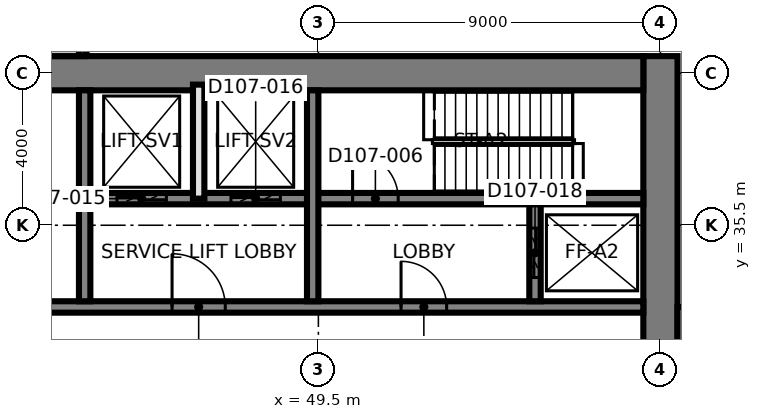
"""IFC4 building model, lengths in metres.
Left out: names, types, materials, properties, quantities, classifications, styles, units other than length and angle.
Written with IfcOpenShell. Run it as: python <this file> out.ifc"""

import sys

from ifc_helpers import new_model, si_unit, direction, frame, frame_2d, origin, place, context, subcontext, project, spatial, rectangle, extrude, element, fill, save


model = new_model("IFC4")
c1 = context("Model", 3, precision=1e-05, world=origin(), true_north=direction((0.0, 1.0)))
c2 = subcontext(c1, "Body", "Model", "MODEL_VIEW")
j1 = project(units=[si_unit("LENGTHUNIT", "METRE"), si_unit("PLANEANGLEUNIT", "RADIAN")], contexts=[c1])
p1 = place(None, origin())
s1 = spatial("IfcSite", under=j1, at=p1, CompositionType="ELEMENT")
p2 = place(p1, origin())
s2 = spatial("IfcBuilding", under=s1, at=p2, CompositionType="ELEMENT")
p3 = place(p2, frame((0.0, 0.0, 28.5)))
s3 = spatial("IfcBuildingStorey", under=s2, at=p3, CompositionType="ELEMENT", Elevation=28.5)
p4 = place(p3, frame((58.5, 21.05, 0.0), z_axis=(0.0, 0.0, 1.0), x_axis=(0.0, 1.0, 0.0)))
e1 = element("IfcWall", 1, at=p4, inside=s3, PredefinedType="SHEAR", context=c2, shape_type="SweptSolid", body=[
    extrude(rectangle(XDim=18.9, YDim=0.9, at=frame_2d((9.45, 0.0))), origin(), (0.0, 0.0, 1.0), 5.0),
])
p5 = place(p3, frame((31.05, 39.5, 0.0), z_axis=(0.0, 0.0, 1.0), x_axis=(1.0, 0.0, 0.0)))
e2 = element("IfcWall", 2, at=p5, inside=s3, PredefinedType="SHEAR", context=c2, shape_type="SweptSolid", body=[
    extrude(rectangle(XDim=27.0, YDim=0.9, at=frame_2d((13.5, 0.0))), origin(), (0.0, 0.0, 1.0), 5.0),
])
p6 = place(p3, frame((31.95, 33.35, 0.0), z_axis=(0.0, 0.0, 1.0), x_axis=(1.0, 0.0, 0.0)))
e3 = element("IfcWall", 3, at=p6, inside=s3, PredefinedType="SHEAR", context=c2, shape_type="SweptSolid", body=[
    extrude(rectangle(XDim=26.1, YDim=0.3, at=frame_2d((13.05, 0.0))), origin(), (0.0, 0.0, 1.0), 5.0),
])
p7 = place(p6, frame((13.7, 0.0, 0.0)))
e4 = element("IfcOpeningElement", 4, at=p7, cuts=e3, PredefinedType="OPENING", context=c2, shape_type="SweptSolid", body=[
    extrude(rectangle(XDim=1.4, YDim=2.1, at=frame_2d((0.7, 1.05))), frame((0.0, 0.16, 0.0), z_axis=(0.0, -1.0, 0.0), x_axis=(1.0, 0.0, 0.0)), (0.0, 0.0, 1.0), 0.32),
])
p8 = place(p6, frame((5.175, 0.0, 0.0)))
e5 = element("IfcOpeningElement", 5, at=p8, cuts=e3, PredefinedType="OPENING", context=c2, shape_type="SweptSolid", body=[
    extrude(rectangle(XDim=1.2, YDim=2.1, at=frame_2d((0.6, 1.05))), frame((0.0, 0.16, 0.0), z_axis=(0.0, -1.0, 0.0), x_axis=(1.0, 0.0, 0.0)), (0.0, 0.0, 1.0), 0.32),
])
p9 = place(p6, frame((19.725, 0.0, 0.0)))
e6 = element("IfcOpeningElement", 6, at=p9, cuts=e3, PredefinedType="OPENING", context=c2, shape_type="SweptSolid", body=[
    extrude(rectangle(XDim=1.2, YDim=2.1, at=frame_2d((0.6, 1.05))), frame((0.0, 0.16, 0.0), z_axis=(0.0, -1.0, 0.0), x_axis=(1.0, 0.0, 0.0)), (0.0, 0.0, 1.0), 0.32),
])
p10 = place(p3, frame((43.5, 36.2, 0.0), z_axis=(0.0, 0.0, 1.0), x_axis=(1.0, 0.0, 0.0)))
e7 = element("IfcWall", 7, at=p10, inside=s3, PredefinedType="SHEAR", context=c2, shape_type="SweptSolid", body=[
    extrude(rectangle(XDim=14.55, YDim=0.3, at=frame_2d((7.275, 0.0))), origin(), (0.0, 0.0, 1.0), 5.0),
])
p11 = place(p10, frame((6.9, 0.0, 0.0)))
e8 = element("IfcOpeningElement", 8, at=p11, cuts=e7, PredefinedType="OPENING", context=c2, shape_type="SweptSolid", body=[
    extrude(rectangle(XDim=1.2, YDim=2.1, at=frame_2d((0.6, 1.05))), frame((0.0, 0.16, 0.0), z_axis=(0.0, -1.0, 0.0), x_axis=(1.0, 0.0, 0.0)), (0.0, 0.0, 1.0), 0.32),
])
p12 = place(p10, frame((0.7, 0.0, 0.0)))
e9 = element("IfcOpeningElement", 9, at=p12, cuts=e7, PredefinedType="OPENING", context=c2, shape_type="SweptSolid", body=[
    extrude(rectangle(XDim=1.3, YDim=2.4, at=frame_2d((0.65, 1.2))), frame((0.0, 0.16, 0.0), z_axis=(0.0, -1.0, 0.0), x_axis=(1.0, 0.0, 0.0)), (0.0, 0.0, 1.0), 0.32),
])
p13 = place(p10, frame((3.7, 0.0, 0.0)))
e10 = element("IfcOpeningElement", 10, at=p13, cuts=e7, PredefinedType="OPENING", context=c2, shape_type="SweptSolid", body=[
    extrude(rectangle(XDim=1.3, YDim=2.4, at=frame_2d((0.65, 1.2))), frame((0.0, 0.16, 0.0), z_axis=(0.0, -1.0, 0.0), x_axis=(1.0, 0.0, 0.0)), (0.0, 0.0, 1.0), 0.32),
])
for number, where, z_axis, x_axis in (
    (11, (43.35, 33.5, 0.0), (0.0, 0.0, 1.0), (0.0, 1.0, 0.0)),
    (12, (49.35, 33.5, 0.0), (0.0, 0.0, 1.0), (0.0, 1.0, 0.0)),
):
    element("IfcWall", number, at=place(p3, frame(where, z_axis=z_axis, x_axis=x_axis)), inside=s3, PredefinedType="SHEAR", context=c2, shape_type="SweptSolid", body=[
        extrude(rectangle(XDim=5.55, YDim=0.3, at=frame_2d((2.775, 0.0))), origin(), (0.0, 0.0, 1.0), 5.0),
    ])
p14 = place(p3, frame((55.2, 33.5, 0.0), z_axis=(0.0, 0.0, 1.0), x_axis=(0.0, 1.0, 0.0)))
e13 = element("IfcWall", 13, at=p14, inside=s3, PredefinedType="SHEAR", context=c2, shape_type="SweptSolid", body=[
    extrude(rectangle(XDim=2.55, YDim=0.3, at=frame_2d((1.275, 0.0))), origin(), (0.0, 0.0, 1.0), 5.0),
])
p15 = place(p14, frame((0.625, 0.0, 0.0)))
e14 = element("IfcOpeningElement", 14, at=p15, cuts=e13, PredefinedType="OPENING", context=c2, shape_type="SweptSolid", body=[
    extrude(rectangle(XDim=1.3, YDim=2.4, at=frame_2d((0.65, 1.2))), frame((0.0, 0.16, 0.0), z_axis=(0.0, -1.0, 0.0), x_axis=(1.0, 0.0, 0.0)), (0.0, 0.0, 1.0), 0.32),
])
p16 = place(p3, frame((40.65, 40.1, 0.0), z_axis=(0.0, 0.0, 1.0), x_axis=(1.0, 0.0, 0.0)))
e15 = element("IfcWall", 15, at=p16, inside=s3, PredefinedType="PARTITIONING", context=c2, shape_type="SweptSolid", body=[
    extrude(rectangle(XDim=2.7, YDim=0.3, at=frame_2d((1.35, 0.0))), origin(), (0.0, 0.0, 1.0), 4.7),
])
p17 = place(p3, frame((46.35, 36.2, 0.0), z_axis=(0.0, 0.0, 1.0), x_axis=(0.0, 1.0, 0.0)))
e16 = element("IfcWall", 16, at=p17, inside=s3, PredefinedType="SOLIDWALL", context=c2, shape_type="SweptSolid", body=[
    extrude(rectangle(XDim=3.0, YDim=0.3, at=frame_2d((1.5, 0.0))), origin(), (0.0, 0.0, 1.0), 4.7),
])
p18 = place(p3, frame((59.1, 30.65, 0.0), z_axis=(0.0, 0.0, 1.0), x_axis=(0.0, 1.0, 0.0)))
e17 = element("IfcWall", 17, at=p18, inside=s3, PredefinedType="PARTITIONING", context=c2, shape_type="SweptSolid", body=[
    extrude(rectangle(XDim=2.7, YDim=0.3, at=frame_2d((1.35, 0.0))), origin(), (0.0, 0.0, 1.0), 4.7),
])
p19 = place(p3, frame((43.3, 39.97, 0.0), z_axis=(0.0, 0.0, 1.0), x_axis=(0.0, 1.0, 0.0)))
e18 = element("IfcWall", 18, at=p19, inside=s3, PredefinedType="PARTITIONING", context=c2, shape_type="SweptSolid", body=[
    extrude(rectangle(XDim=2.28, YDim=0.2, at=frame_2d((1.14, 0.0))), origin(), (0.0, 0.0, 1.0), 4.7),
])
p20 = place(p7, origin())
e19 = element("IfcDoor", 19, at=p20, inside=s3, OperationType="SINGLE_SWING_RIGHT", PredefinedType="DOOR", context=c2, shape_type="SweptSolid", body=[
    extrude(rectangle(XDim=1.4, YDim=2.1, at=frame_2d((0.7, 1.05))), frame((0.0, 0.025, 0.0), z_axis=(0.0, -1.0, 0.0), x_axis=(1.0, 0.0, 0.0)), (0.0, 0.0, 1.0), 0.05),
])
fill(e4, e19)
p21 = place(p9, origin())
e20 = element("IfcDoor", 20, at=p21, inside=s3, OperationType="SINGLE_SWING_RIGHT", PredefinedType="DOOR", context=c2, shape_type="SweptSolid", body=[
    extrude(rectangle(XDim=1.2, YDim=2.1, at=frame_2d((0.6, 1.05))), frame((0.0, 0.025, 0.0), z_axis=(0.0, -1.0, 0.0), x_axis=(1.0, 0.0, 0.0)), (0.0, 0.0, 1.0), 0.05),
])
fill(e6, e20)
p22 = place(p11, origin())
e21 = element("IfcDoor", 21, at=p22, inside=s3, OperationType="SINGLE_SWING_LEFT", PredefinedType="DOOR", context=c2, shape_type="SweptSolid", body=[
    extrude(rectangle(XDim=1.2, YDim=2.1, at=frame_2d((0.6, 1.05))), frame((0.0, 0.025, 0.0), z_axis=(0.0, -1.0, 0.0), x_axis=(1.0, 0.0, 0.0)), (0.0, 0.0, 1.0), 0.05),
])
fill(e8, e21)
p23 = place(p12, origin())
e22 = element("IfcDoor", 22, at=p23, inside=s3, OperationType="SLIDING_TO_LEFT", PredefinedType="DOOR", context=c2, shape_type="SweptSolid", body=[
    extrude(rectangle(XDim=1.3, YDim=2.4, at=frame_2d((0.65, 1.2))), frame((0.0, 0.025, 0.0), z_axis=(0.0, -1.0, 0.0), x_axis=(1.0, 0.0, 0.0)), (0.0, 0.0, 1.0), 0.05),
])
fill(e9, e22)
p24 = place(p13, origin())
e23 = element("IfcDoor", 23, at=p24, inside=s3, OperationType="SLIDING_TO_LEFT", PredefinedType="DOOR", context=c2, shape_type="SweptSolid", body=[
    extrude(rectangle(XDim=1.3, YDim=2.4, at=frame_2d((0.65, 1.2))), frame((0.0, 0.025, 0.0), z_axis=(0.0, -1.0, 0.0), x_axis=(1.0, 0.0, 0.0)), (0.0, 0.0, 1.0), 0.05),
])
fill(e10, e23)
p25 = place(p15, origin())
e24 = element("IfcDoor", 24, at=p25, inside=s3, OperationType="SLIDING_TO_LEFT", PredefinedType="DOOR", context=c2, shape_type="SweptSolid", body=[
    extrude(rectangle(XDim=1.3, YDim=2.4, at=frame_2d((0.65, 1.2))), frame((0.0, 0.025, 0.0), z_axis=(0.0, -1.0, 0.0), x_axis=(1.0, 0.0, 0.0)), (0.0, 0.0, 1.0), 0.05),
])
fill(e14, e24)
save(model, sys.argv[1])
